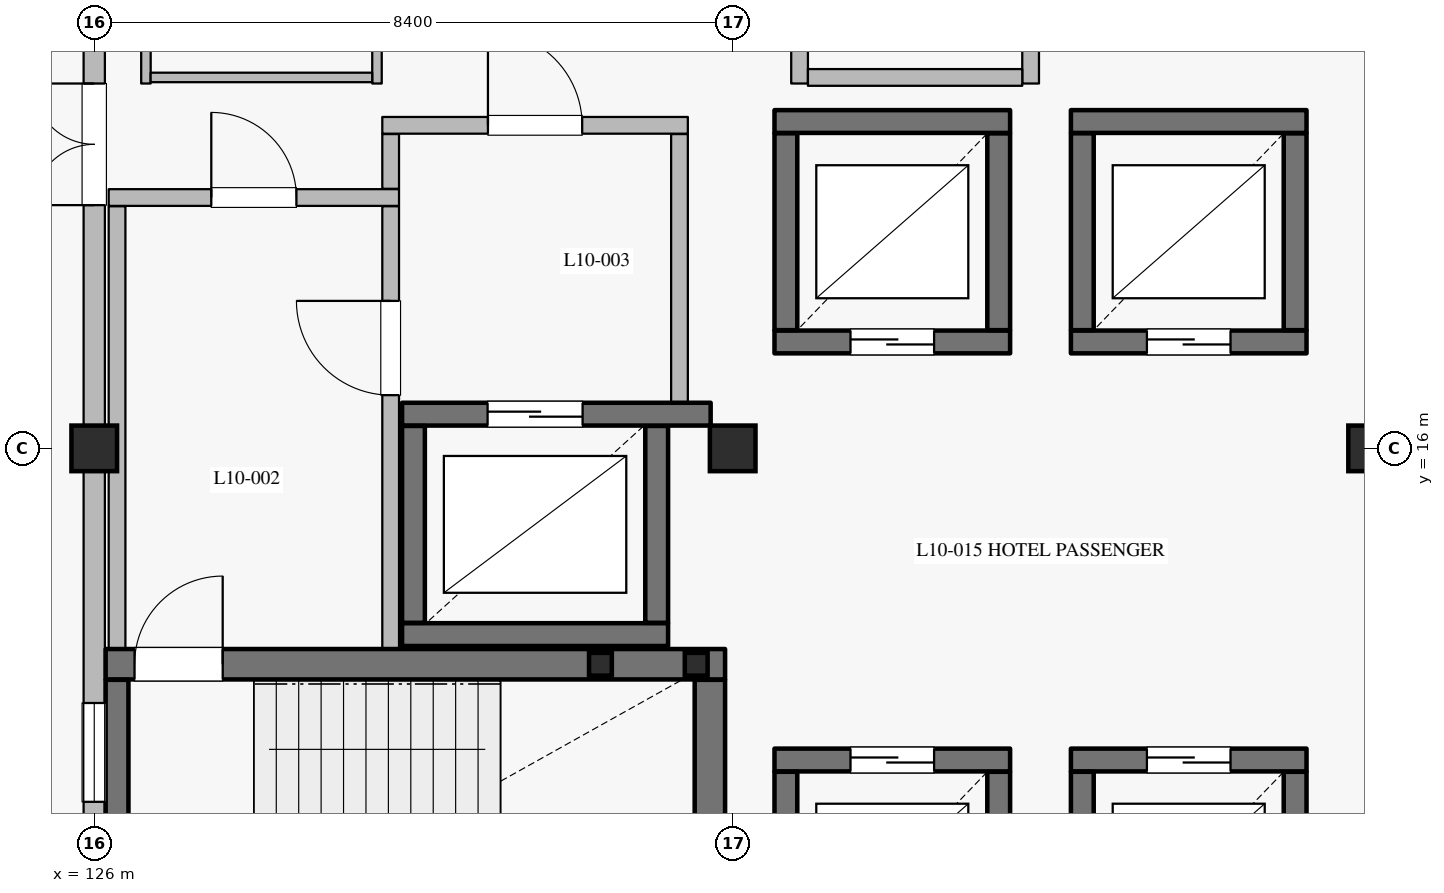
"""IFC4 building model, lengths in metres.
Left out: names, types, materials, properties, quantities, classifications, styles, units other than length and angle.
Written with IfcOpenShell. Run it as: python <this file> out.ifc"""

import sys

from ifc_helpers import new_model, si_unit, direction, frame, frame_2d, origin, origin_2d, place, context, subcontext, project, spatial, rectangle, hollow_rectangle, extrude, element, fill, save


model = new_model("IFC4")
c1 = context("Model", 3, precision=1e-05, world=origin(), true_north=direction((0.0, 1.0)))
c2 = subcontext(c1, "Body", "Model", "MODEL_VIEW")
j1 = project(units=[si_unit("LENGTHUNIT", "METRE"), si_unit("PLANEANGLEUNIT", "RADIAN")], contexts=[c1])
p1 = place(None, origin())
s1 = spatial("IfcSite", under=j1, at=p1, CompositionType="ELEMENT")
p2 = place(p1, origin())
s2 = spatial("IfcBuilding", under=s1, at=p2, CompositionType="ELEMENT")
p3 = place(p2, frame((0.0, 0.0, 43.2)))
s3 = spatial("IfcBuildingStorey", under=s2, at=p3, CompositionType="ELEMENT", Elevation=43.2)
for number, where, z_axis, x_axis in (
    (1, (126.0, 16.0, 0.0), (0.0, 0.0, 1.0), (1.0, 0.0, 0.0)),
    (2, (134.4, 16.0, 0.0), (0.0, 0.0, 1.0), (1.0, 0.0, 0.0)),
    (3, (142.8, 16.0, 0.0), (0.0, 0.0, 1.0), (1.0, 0.0, 0.0)),
):
    element("IfcColumn", number, at=place(p3, frame(where, z_axis=z_axis, x_axis=x_axis)), inside=s3, PredefinedType="COLUMN", context=c2, shape_type="SweptSolid", body=[
        extrude(rectangle(XDim=0.6, YDim=0.6, at=origin_2d()), origin(), (0.0, 0.0, 1.0), 4.2),
    ])
p4 = place(p3, frame((126.0, 8.3, 0.0), z_axis=(0.0, 0.0, 1.0), x_axis=(0.0, 1.0, 0.0)))
e4 = element("IfcWall", 4, at=p4, inside=s3, PredefinedType="SOLIDWALL", context=c2, shape_type="SweptSolid", body=[
    extrude(rectangle(XDim=7.4, YDim=0.28, at=frame_2d((3.7, 0.0))), origin(), (0.0, 0.0, 1.0), 3.3),
])
p5 = place(p4, frame((3.05, 0.0, 0.75)))
e5 = element("IfcOpeningElement", 5, at=p5, cuts=e4, PredefinedType="OPENING", context=c2, shape_type="SweptSolid", body=[
    extrude(rectangle(XDim=1.3, YDim=1.65, at=frame_2d((0.65, 0.825))), frame((0.0, 0.15, 0.0), z_axis=(0.0, -1.0, 0.0), x_axis=(1.0, 0.0, 0.0)), (0.0, 0.0, 1.0), 0.3),
])
p6 = place(p3, frame((126.0, 16.3, 0.0), z_axis=(0.0, 0.0, 1.0), x_axis=(0.0, 1.0, 0.0)))
e6 = element("IfcWall", 6, at=p6, inside=s3, PredefinedType="SOLIDWALL", context=c2, shape_type="SweptSolid", body=[
    extrude(rectangle(XDim=7.4, YDim=0.28, at=frame_2d((3.7, 0.0))), origin(), (0.0, 0.0, 1.0), 3.3),
])
p7 = place(p6, frame((2.9, 0.0, 0.0)))
e7 = element("IfcOpeningElement", 7, at=p7, cuts=e6, PredefinedType="OPENING", context=c2, shape_type="SweptSolid", body=[
    extrude(rectangle(XDim=1.6, YDim=2.25, at=frame_2d((0.8, 1.125))), frame((0.0, 0.15, 0.0), z_axis=(0.0, -1.0, 0.0), x_axis=(1.0, 0.0, 0.0)), (0.0, 0.0, 1.0), 0.3),
])
p8 = place(p3, frame((134.95, 17.4, 0.0), z_axis=(0.0, 0.0, 1.0), x_axis=(1.0, 0.0, 0.0)))
e8 = element("IfcWall", 8, at=p8, inside=s3, PredefinedType="SHEAR", context=c2, shape_type="SweptSolid", body=[
    extrude(rectangle(XDim=3.1, YDim=0.3, at=frame_2d((1.55, 0.0))), origin(), (0.0, 0.0, 1.0), 3.935),
])
p9 = place(p8, frame((1.0, 0.0, 0.0)))
e9 = element("IfcOpeningElement", 9, at=p9, cuts=e8, PredefinedType="OPENING", context=c2, shape_type="SweptSolid", body=[
    extrude(rectangle(XDim=1.1, YDim=2.2, at=frame_2d((0.55, 1.1))), frame((0.0, 0.16, 0.0), z_axis=(0.0, -1.0, 0.0), x_axis=(1.0, 0.0, 0.0)), (0.0, 0.0, 1.0), 0.32),
])
p10 = place(p3, frame((137.9, 17.555, 0.0), z_axis=(0.0, 0.0, 1.0), x_axis=(0.0, 1.0, 0.0)))
e10 = element("IfcWall", 10, at=p10, inside=s3, PredefinedType="SHEAR", context=c2, shape_type="SweptSolid", body=[
    extrude(rectangle(XDim=2.59, YDim=0.3, at=frame_2d((1.295, 0.0))), origin(), (0.0, 0.0, 1.0), 3.935),
])
p11 = place(p3, frame((138.05, 20.3, 0.0), z_axis=(0.0, 0.0, 1.0), x_axis=(-1.0, 0.0, 0.0)))
e11 = element("IfcWall", 11, at=p11, inside=s3, PredefinedType="SHEAR", context=c2, shape_type="SweptSolid", body=[
    extrude(rectangle(XDim=3.1, YDim=0.3, at=frame_2d((1.55, 0.0))), origin(), (0.0, 0.0, 1.0), 3.935),
])
p12 = place(p3, frame((135.1, 20.145, 0.0), z_axis=(0.0, 0.0, 1.0), x_axis=(0.0, -1.0, 0.0)))
e12 = element("IfcWall", 12, at=p12, inside=s3, PredefinedType="SHEAR", context=c2, shape_type="SweptSolid", body=[
    extrude(rectangle(XDim=2.59, YDim=0.3, at=frame_2d((1.295, 0.0))), origin(), (0.0, 0.0, 1.0), 3.935),
])
p13 = place(p3, frame((138.85, 17.4, 0.0), z_axis=(0.0, 0.0, 1.0), x_axis=(1.0, 0.0, 0.0)))
e13 = element("IfcWall", 13, at=p13, inside=s3, PredefinedType="SHEAR", context=c2, shape_type="SweptSolid", body=[
    extrude(rectangle(XDim=3.1, YDim=0.3, at=frame_2d((1.55, 0.0))), origin(), (0.0, 0.0, 1.0), 3.935),
])
p14 = place(p13, frame((1.0, 0.0, 0.0)))
e14 = element("IfcOpeningElement", 14, at=p14, cuts=e13, PredefinedType="OPENING", context=c2, shape_type="SweptSolid", body=[
    extrude(rectangle(XDim=1.1, YDim=2.2, at=frame_2d((0.55, 1.1))), frame((0.0, 0.16, 0.0), z_axis=(0.0, -1.0, 0.0), x_axis=(1.0, 0.0, 0.0)), (0.0, 0.0, 1.0), 0.32),
])
p15 = place(p3, frame((141.8, 17.555, 0.0), z_axis=(0.0, 0.0, 1.0), x_axis=(0.0, 1.0, 0.0)))
e15 = element("IfcWall", 15, at=p15, inside=s3, PredefinedType="SHEAR", context=c2, shape_type="SweptSolid", body=[
    extrude(rectangle(XDim=2.59, YDim=0.3, at=frame_2d((1.295, 0.0))), origin(), (0.0, 0.0, 1.0), 3.935),
])
p16 = place(p3, frame((141.95, 20.3, 0.0), z_axis=(0.0, 0.0, 1.0), x_axis=(-1.0, 0.0, 0.0)))
e16 = element("IfcWall", 16, at=p16, inside=s3, PredefinedType="SHEAR", context=c2, shape_type="SweptSolid", body=[
    extrude(rectangle(XDim=3.1, YDim=0.3, at=frame_2d((1.55, 0.0))), origin(), (0.0, 0.0, 1.0), 3.935),
])
for number, where, z_axis, x_axis in (
    (17, (139.0, 20.145, 0.0), (0.0, 0.0, 1.0), (0.0, -1.0, 0.0)),
    (18, (137.9, 9.155, 0.0), (0.0, 0.0, 1.0), (0.0, 1.0, 0.0)),
):
    element("IfcWall", number, at=place(p3, frame(where, z_axis=z_axis, x_axis=x_axis)), inside=s3, PredefinedType="SHEAR", context=c2, shape_type="SweptSolid", body=[
        extrude(rectangle(XDim=2.59, YDim=0.3, at=frame_2d((1.295, 0.0))), origin(), (0.0, 0.0, 1.0), 3.935),
    ])
p17 = place(p3, frame((138.05, 11.9, 0.0), z_axis=(0.0, 0.0, 1.0), x_axis=(-1.0, 0.0, 0.0)))
e19 = element("IfcWall", 19, at=p17, inside=s3, PredefinedType="SHEAR", context=c2, shape_type="SweptSolid", body=[
    extrude(rectangle(XDim=3.1, YDim=0.3, at=frame_2d((1.55, 0.0))), origin(), (0.0, 0.0, 1.0), 3.935),
])
p18 = place(p17, frame((1.0, 0.0, 0.0)))
e20 = element("IfcOpeningElement", 20, at=p18, cuts=e19, PredefinedType="OPENING", context=c2, shape_type="SweptSolid", body=[
    extrude(rectangle(XDim=1.1, YDim=2.2, at=frame_2d((0.55, 1.1))), frame((0.0, 0.16, 0.0), z_axis=(0.0, -1.0, 0.0), x_axis=(1.0, 0.0, 0.0)), (0.0, 0.0, 1.0), 0.32),
])
for number, where, z_axis, x_axis in (
    (21, (135.1, 11.745, 0.0), (0.0, 0.0, 1.0), (0.0, -1.0, 0.0)),
    (22, (141.8, 9.155, 0.0), (0.0, 0.0, 1.0), (0.0, 1.0, 0.0)),
):
    element("IfcWall", number, at=place(p3, frame(where, z_axis=z_axis, x_axis=x_axis)), inside=s3, PredefinedType="SHEAR", context=c2, shape_type="SweptSolid", body=[
        extrude(rectangle(XDim=2.59, YDim=0.3, at=frame_2d((1.295, 0.0))), origin(), (0.0, 0.0, 1.0), 3.935),
    ])
p19 = place(p3, frame((141.95, 11.9, 0.0), z_axis=(0.0, 0.0, 1.0), x_axis=(-1.0, 0.0, 0.0)))
e23 = element("IfcWall", 23, at=p19, inside=s3, PredefinedType="SHEAR", context=c2, shape_type="SweptSolid", body=[
    extrude(rectangle(XDim=3.1, YDim=0.3, at=frame_2d((1.55, 0.0))), origin(), (0.0, 0.0, 1.0), 3.935),
])
p20 = place(p19, frame((1.0, 0.0, 0.0)))
e24 = element("IfcOpeningElement", 24, at=p20, cuts=e23, PredefinedType="OPENING", context=c2, shape_type="SweptSolid", body=[
    extrude(rectangle(XDim=1.1, YDim=2.2, at=frame_2d((0.55, 1.1))), frame((0.0, 0.16, 0.0), z_axis=(0.0, -1.0, 0.0), x_axis=(1.0, 0.0, 0.0)), (0.0, 0.0, 1.0), 0.32),
])
p21 = place(p3, frame((139.0, 11.745, 0.0), z_axis=(0.0, 0.0, 1.0), x_axis=(0.0, -1.0, 0.0)))
e25 = element("IfcWall", 25, at=p21, inside=s3, PredefinedType="SHEAR", context=c2, shape_type="SweptSolid", body=[
    extrude(rectangle(XDim=2.59, YDim=0.3, at=frame_2d((1.295, 0.0))), origin(), (0.0, 0.0, 1.0), 3.935),
])
p22 = place(p3, frame((130.05, 13.55, 0.0), z_axis=(0.0, 0.0, 1.0), x_axis=(1.0, 0.0, 0.0)))
e26 = element("IfcWall", 26, at=p22, inside=s3, PredefinedType="SHEAR", context=c2, shape_type="SweptSolid", body=[
    extrude(rectangle(XDim=3.5, YDim=0.3, at=frame_2d((1.75, 0.0))), origin(), (0.0, 0.0, 1.0), 3.935),
])
p23 = place(p3, frame((133.4, 13.705, 0.0), z_axis=(0.0, 0.0, 1.0), x_axis=(0.0, 1.0, 0.0)))
e27 = element("IfcWall", 27, at=p23, inside=s3, PredefinedType="SHEAR", context=c2, shape_type="SweptSolid", body=[
    extrude(rectangle(XDim=2.59, YDim=0.3, at=frame_2d((1.295, 0.0))), origin(), (0.0, 0.0, 1.0), 3.935),
])
p24 = place(p3, frame((134.11, 16.45, 0.0), z_axis=(0.0, 0.0, 1.0), x_axis=(-1.0, 0.0, 0.0)))
e28 = element("IfcWall", 28, at=p24, inside=s3, PredefinedType="SHEAR", context=c2, shape_type="SweptSolid", body=[
    extrude(rectangle(XDim=4.06, YDim=0.3, at=frame_2d((2.03, 0.0))), origin(), (0.0, 0.0, 1.0), 3.935),
])
p25 = place(p24, frame((1.685, 0.0, 0.0)))
e29 = element("IfcOpeningElement", 29, at=p25, cuts=e28, PredefinedType="OPENING", context=c2, shape_type="SweptSolid", body=[
    extrude(rectangle(XDim=1.25, YDim=2.25, at=frame_2d((0.625, 1.125))), frame((0.0, 0.16, 0.0), z_axis=(0.0, -1.0, 0.0), x_axis=(1.0, 0.0, 0.0)), (0.0, 0.0, 1.0), 0.32),
])
p26 = place(p3, frame((130.2, 16.295, 0.0), z_axis=(0.0, 0.0, 1.0), x_axis=(0.0, -1.0, 0.0)))
e30 = element("IfcWall", 30, at=p26, inside=s3, PredefinedType="SHEAR", context=c2, shape_type="SweptSolid", body=[
    extrude(rectangle(XDim=2.59, YDim=0.3, at=frame_2d((1.295, 0.0))), origin(), (0.0, 0.0, 1.0), 3.935),
])
p27 = place(p3, frame((134.1, 9.005, 0.0), z_axis=(0.0, 0.0, 1.0), x_axis=(0.0, 1.0, 0.0)))
e31 = element("IfcWall", 31, at=p27, inside=s3, PredefinedType="SHEAR", context=c2, shape_type="SweptSolid", body=[
    extrude(rectangle(XDim=3.95, YDim=0.4, at=frame_2d((1.975, 0.0))), origin(), (0.0, 0.0, 1.0), 3.935),
])
p28 = place(p3, frame((126.15, 13.16, 0.0), z_axis=(0.0, 0.0, 1.0), x_axis=(1.0, 0.0, 0.0)))
e32 = element("IfcWall", 32, at=p28, inside=s3, PredefinedType="SHEAR", context=c2, shape_type="SweptSolid", body=[
    extrude(rectangle(XDim=8.15, YDim=0.4, at=frame_2d((4.075, 0.0))), origin(), (0.0, 0.0, 1.0), 3.935),
])
p29 = place(p28, frame((0.38, 0.0, 0.0)))
e33 = element("IfcOpeningElement", 33, at=p29, cuts=e32, PredefinedType="OPENING", context=c2, shape_type="SweptSolid", body=[
    extrude(rectangle(XDim=1.16, YDim=2.2, at=frame_2d((0.58, 1.1))), frame((0.0, 0.21, 0.0), z_axis=(0.0, -1.0, 0.0), x_axis=(1.0, 0.0, 0.0)), (0.0, 0.0, 1.0), 0.42),
])
p30 = place(p3, frame((126.3, 9.005, 0.0), z_axis=(0.0, 0.0, 1.0), x_axis=(0.0, 1.0, 0.0)))
e34 = element("IfcWall", 34, at=p30, inside=s3, PredefinedType="SHEAR", context=c2, shape_type="SweptSolid", body=[
    extrude(rectangle(XDim=3.95, YDim=0.3, at=frame_2d((1.975, 0.0))), origin(), (0.0, 0.0, 1.0), 3.935),
])
p31 = place(p3, frame((126.3, 13.365, 0.0), z_axis=(0.0, 0.0, 1.0), x_axis=(0.0, 1.0, 0.0)))
e35 = element("IfcWall", 35, at=p31, inside=s3, PredefinedType="PARTITIONING", context=c2, shape_type="SweptSolid", body=[
    extrude(rectangle(XDim=5.82, YDim=0.22, at=frame_2d((2.91, 0.0))), origin(), (0.0, 0.0, 1.0), 3.935),
])
p32 = place(p3, frame((126.19, 19.3, 0.0), z_axis=(0.0, 0.0, 1.0), x_axis=(1.0, 0.0, 0.0)))
e36 = element("IfcWall", 36, at=p32, inside=s3, PredefinedType="PARTITIONING", context=c2, shape_type="SweptSolid", body=[
    extrude(rectangle(XDim=3.82, YDim=0.22, at=frame_2d((1.91, 0.0))), origin(), (0.0, 0.0, 1.0), 3.935),
])
p33 = place(p32, frame((1.35, 0.0, 0.0)))
e37 = element("IfcOpeningElement", 37, at=p33, cuts=e36, PredefinedType="OPENING", context=c2, shape_type="SweptSolid", body=[
    extrude(rectangle(XDim=1.12, YDim=2.2, at=frame_2d((0.56, 1.1))), frame((0.0, 0.12, 0.0), z_axis=(0.0, -1.0, 0.0), x_axis=(1.0, 0.0, 0.0)), (0.0, 0.0, 1.0), 0.24),
])
p34 = place(p3, frame((129.9, 13.365, 0.0), z_axis=(0.0, 0.0, 1.0), x_axis=(0.0, 1.0, 0.0)))
e38 = element("IfcWall", 38, at=p34, inside=s3, PredefinedType="PARTITIONING", context=c2, shape_type="SweptSolid", body=[
    extrude(rectangle(XDim=5.82, YDim=0.22, at=frame_2d((2.91, 0.0))), origin(), (0.0, 0.0, 1.0), 3.935),
])
p35 = place(p34, frame((3.335, 0.0, 0.0)))
e39 = element("IfcOpeningElement", 39, at=p35, cuts=e38, PredefinedType="OPENING", context=c2, shape_type="SweptSolid", body=[
    extrude(rectangle(XDim=1.24, YDim=2.2, at=frame_2d((0.62, 1.1))), frame((0.0, 0.12, 0.0), z_axis=(0.0, -1.0, 0.0), x_axis=(1.0, 0.0, 0.0)), (0.0, 0.0, 1.0), 0.24),
])
p36 = place(p3, frame((129.9, 19.415, 0.0), z_axis=(0.0, 0.0, 1.0), x_axis=(0.0, 1.0, 0.0)))
e40 = element("IfcWall", 40, at=p36, inside=s3, PredefinedType="PARTITIONING", context=c2, shape_type="SweptSolid", body=[
    extrude(rectangle(XDim=0.72, YDim=0.22, at=frame_2d((0.36, 0.0))), origin(), (0.0, 0.0, 1.0), 3.935),
])
p37 = place(p3, frame((133.7, 16.605, 0.0), z_axis=(0.0, 0.0, 1.0), x_axis=(0.0, 1.0, 0.0)))
e41 = element("IfcWall", 41, at=p37, inside=s3, PredefinedType="PARTITIONING", context=c2, shape_type="SweptSolid", body=[
    extrude(rectangle(XDim=3.53, YDim=0.22, at=frame_2d((1.765, 0.0))), origin(), (0.0, 0.0, 1.0), 3.935),
])
p38 = place(p3, frame((129.79, 20.25, 0.0), z_axis=(0.0, 0.0, 1.0), x_axis=(1.0, 0.0, 0.0)))
e42 = element("IfcWall", 42, at=p38, inside=s3, PredefinedType="PARTITIONING", context=c2, shape_type="SweptSolid", body=[
    extrude(rectangle(XDim=4.02, YDim=0.22, at=frame_2d((2.01, 0.0))), origin(), (0.0, 0.0, 1.0), 3.935),
])
p39 = place(p38, frame((1.39, 0.0, 0.0)))
e43 = element("IfcOpeningElement", 43, at=p39, cuts=e42, PredefinedType="OPENING", context=c2, shape_type="SweptSolid", body=[
    extrude(rectangle(XDim=1.24, YDim=2.2, at=frame_2d((0.62, 1.1))), frame((0.0, 0.12, 0.0), z_axis=(0.0, -1.0, 0.0), x_axis=(1.0, 0.0, 0.0)), (0.0, 0.0, 1.0), 0.24),
])
for number, where, z_axis, x_axis in (
    (44, (132.66, 13.16, -1.8), (0.0, 0.0, 1.0), (1.0, 0.0, 0.0)),
    (45, (133.92, 13.16, -1.8), (0.0, 0.0, 1.0), (1.0, 0.0, 0.0)),
):
    element("IfcColumn", number, at=place(p3, frame(where, z_axis=z_axis, x_axis=x_axis)), inside=s3, PredefinedType="COLUMN", context=c2, shape_type="SweptSolid", body=[
        extrude(hollow_rectangle(XDim=0.3, YDim=0.3, WallThickness=0.012, at=origin_2d()), origin(), (0.0, 0.0, 1.0), 3.72),
    ])
for number, where, z_axis, x_axis in (
    (46, (135.28, 20.8, 0.0), (0.0, 0.0, 1.0), (0.0, 1.0, 0.0)),
    (47, (138.32, 20.8, 0.0), (0.0, 0.0, 1.0), (0.0, 1.0, 0.0)),
):
    element("IfcWall", number, at=place(p3, frame(where, z_axis=z_axis, x_axis=x_axis)), inside=s3, PredefinedType="PARTITIONING", context=c2, shape_type="SweptSolid", body=[
        extrude(rectangle(XDim=2.748, YDim=0.22, at=frame_2d((1.374, 0.0))), origin(), (0.0, 0.0, 1.0), 3.935),
    ])
p40 = place(p3, frame((135.39, 20.88, 0.0), z_axis=(0.0, 0.0, 1.0), x_axis=(1.0, 0.0, 0.0)))
e48 = element("IfcWall", 48, at=p40, inside=s3, PredefinedType="PARTITIONING", context=c2, shape_type="SweptSolid", body=[
    extrude(rectangle(XDim=2.82, YDim=0.22, at=frame_2d((1.41, 0.0))), origin(), (0.0, 0.0, 1.0), 3.935),
])
for number, where, z_axis, x_axis in (
    (49, (126.68, 20.8, 0.0), (0.0, 0.0, 1.0), (0.0, 1.0, 0.0)),
    (50, (129.72, 20.8, 0.0), (0.0, 0.0, 1.0), (0.0, 1.0, 0.0)),
):
    element("IfcWall", number, at=place(p3, frame(where, z_axis=z_axis, x_axis=x_axis)), inside=s3, PredefinedType="PARTITIONING", context=c2, shape_type="SweptSolid", body=[
        extrude(rectangle(XDim=2.796, YDim=0.125, at=frame_2d((1.398, 0.0))), origin(), (0.0, 0.0, 1.0), 3.935),
    ])
p41 = place(p3, frame((126.742, 20.88, 0.0), z_axis=(0.0, 0.0, 1.0), x_axis=(1.0, 0.0, 0.0)))
e51 = element("IfcWall", 51, at=p41, inside=s3, PredefinedType="PARTITIONING", context=c2, shape_type="SweptSolid", body=[
    extrude(rectangle(XDim=2.915, YDim=0.125, at=frame_2d((1.458, 0.0))), origin(), (0.0, 0.0, 1.0), 3.935),
])
p42 = place(p5, origin())
e52 = element("IfcWindow", 52, at=p42, inside=s3, PartitioningType="SINGLE_PANEL", PredefinedType="WINDOW", context=c2, shape_type="SweptSolid", body=[
    extrude(rectangle(XDim=1.3, YDim=1.65, at=frame_2d((0.65, 0.825))), frame((0.0, 0.03, 0.0), z_axis=(0.0, -1.0, 0.0), x_axis=(1.0, 0.0, 0.0)), (0.0, 0.0, 1.0), 0.06),
])
fill(e5, e52)
p43 = place(p7, origin())
e53 = element("IfcDoor", 53, at=p43, inside=s3, OperationType="DOUBLE_DOOR_SINGLE_SWING", PredefinedType="DOOR", context=c2, shape_type="SweptSolid", body=[
    extrude(rectangle(XDim=1.6, YDim=2.25, at=frame_2d((0.8, 1.125))), frame((0.0, 0.025, 0.0), z_axis=(0.0, -1.0, 0.0), x_axis=(1.0, 0.0, 0.0)), (0.0, 0.0, 1.0), 0.05),
])
fill(e7, e53)
p44 = place(p9, origin())
e54 = element("IfcDoor", 54, at=p44, inside=s3, OperationType="DOUBLE_DOOR_SLIDING", PredefinedType="DOOR", context=c2, shape_type="SweptSolid", body=[
    extrude(rectangle(XDim=1.1, YDim=2.2, at=frame_2d((0.55, 1.1))), frame((0.0, 0.025, 0.0), z_axis=(0.0, -1.0, 0.0), x_axis=(1.0, 0.0, 0.0)), (0.0, 0.0, 1.0), 0.05),
])
fill(e9, e54)
p45 = place(p14, origin())
e55 = element("IfcDoor", 55, at=p45, inside=s3, OperationType="DOUBLE_DOOR_SLIDING", PredefinedType="DOOR", context=c2, shape_type="SweptSolid", body=[
    extrude(rectangle(XDim=1.1, YDim=2.2, at=frame_2d((0.55, 1.1))), frame((0.0, 0.025, 0.0), z_axis=(0.0, -1.0, 0.0), x_axis=(1.0, 0.0, 0.0)), (0.0, 0.0, 1.0), 0.05),
])
fill(e14, e55)
p46 = place(p18, origin())
e56 = element("IfcDoor", 56, at=p46, inside=s3, OperationType="DOUBLE_DOOR_SLIDING", PredefinedType="DOOR", context=c2, shape_type="SweptSolid", body=[
    extrude(rectangle(XDim=1.1, YDim=2.2, at=frame_2d((0.55, 1.1))), frame((0.0, 0.025, 0.0), z_axis=(0.0, -1.0, 0.0), x_axis=(1.0, 0.0, 0.0)), (0.0, 0.0, 1.0), 0.05),
])
fill(e20, e56)
p47 = place(p20, origin())
e57 = element("IfcDoor", 57, at=p47, inside=s3, OperationType="DOUBLE_DOOR_SLIDING", PredefinedType="DOOR", context=c2, shape_type="SweptSolid", body=[
    extrude(rectangle(XDim=1.1, YDim=2.2, at=frame_2d((0.55, 1.1))), frame((0.0, 0.025, 0.0), z_axis=(0.0, -1.0, 0.0), x_axis=(1.0, 0.0, 0.0)), (0.0, 0.0, 1.0), 0.05),
])
fill(e24, e57)
p48 = place(p25, origin())
e58 = element("IfcDoor", 58, at=p48, inside=s3, OperationType="DOUBLE_DOOR_SLIDING", PredefinedType="DOOR", context=c2, shape_type="SweptSolid", body=[
    extrude(rectangle(XDim=1.25, YDim=2.25, at=frame_2d((0.625, 1.125))), frame((0.0, 0.025, 0.0), z_axis=(0.0, -1.0, 0.0), x_axis=(1.0, 0.0, 0.0)), (0.0, 0.0, 1.0), 0.05),
])
fill(e29, e58)
p49 = place(p29, origin())
e59 = element("IfcDoor", 59, at=p49, inside=s3, OperationType="SINGLE_SWING_RIGHT", PredefinedType="DOOR", context=c2, shape_type="SweptSolid", body=[
    extrude(rectangle(XDim=1.16, YDim=2.2, at=frame_2d((0.58, 1.1))), frame((0.0, 0.025, 0.0), z_axis=(0.0, -1.0, 0.0), x_axis=(1.0, 0.0, 0.0)), (0.0, 0.0, 1.0), 0.05),
])
fill(e33, e59)
p50 = place(p33, origin())
e60 = element("IfcDoor", 60, at=p50, inside=s3, OperationType="SINGLE_SWING_LEFT", PredefinedType="DOOR", context=c2, shape_type="SweptSolid", body=[
    extrude(rectangle(XDim=1.12, YDim=2.2, at=frame_2d((0.56, 1.1))), frame((0.0, 0.025, 0.0), z_axis=(0.0, -1.0, 0.0), x_axis=(1.0, 0.0, 0.0)), (0.0, 0.0, 1.0), 0.05),
])
fill(e37, e60)
p51 = place(p35, origin())
e61 = element("IfcDoor", 61, at=p51, inside=s3, OperationType="SINGLE_SWING_RIGHT", PredefinedType="DOOR", context=c2, shape_type="SweptSolid", body=[
    extrude(rectangle(XDim=1.24, YDim=2.2, at=frame_2d((0.62, 1.1))), frame((0.0, 0.025, 0.0), z_axis=(0.0, -1.0, 0.0), x_axis=(1.0, 0.0, 0.0)), (0.0, 0.0, 1.0), 0.05),
])
fill(e39, e61)
p52 = place(p39, origin())
e62 = element("IfcDoor", 62, at=p52, inside=s3, OperationType="SINGLE_SWING_LEFT", PredefinedType="DOOR", context=c2, shape_type="SweptSolid", body=[
    extrude(rectangle(XDim=1.24, YDim=2.2, at=frame_2d((0.62, 1.1))), frame((0.0, 0.025, 0.0), z_axis=(0.0, -1.0, 0.0), x_axis=(1.0, 0.0, 0.0)), (0.0, 0.0, 1.0), 0.05),
])
fill(e43, e62)
save(model, sys.argv[1])
